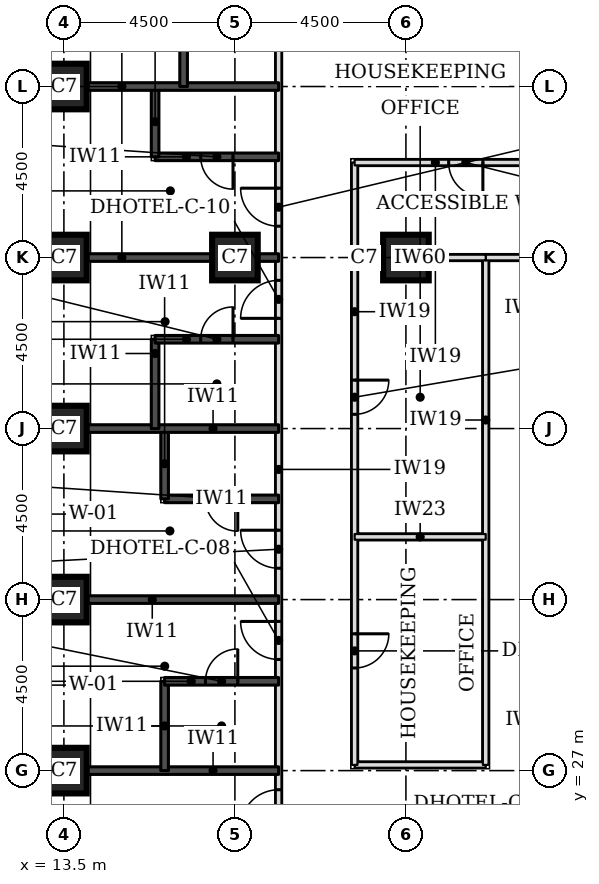
"""IFC4 building model, lengths in metres.
Left out: names, types, materials, properties, quantities, classifications, styles, units other than length and angle.
Written with IfcOpenShell. Run it as: python <this file> out.ifc"""

import sys

from ifc_helpers import new_model, si_unit, direction, frame, frame_2d, origin, origin_2d, place, context, subcontext, project, spatial, rectangle, extrude, element, fill, save


model = new_model("IFC4")
c1 = context("Model", 3, precision=1e-05, world=origin(), true_north=direction((0.0, 1.0)))
c2 = subcontext(c1, "Body", "Model", "MODEL_VIEW")
j1 = project(units=[si_unit("LENGTHUNIT", "METRE"), si_unit("PLANEANGLEUNIT", "RADIAN")], contexts=[c1])
p1 = place(None, origin())
s1 = spatial("IfcSite", under=j1, at=p1, CompositionType="ELEMENT")
p2 = place(p1, origin())
s2 = spatial("IfcBuilding", under=s1, at=p2, CompositionType="ELEMENT")
p3 = place(p2, frame((0.0, 0.0, 33.0)))
s3 = spatial("IfcBuildingStorey", under=s2, at=p3, CompositionType="ELEMENT", Elevation=33.0)
for number, where, z_axis, x_axis in (
    (1, (13.5, 27.0, 0.0), (0.0, 0.0, 1.0), (1.0, 0.0, 0.0)),
    (2, (13.5, 31.5, 0.0), (0.0, 0.0, 1.0), (1.0, 0.0, 0.0)),
    (3, (13.5, 36.0, 0.0), (0.0, 0.0, 1.0), (1.0, 0.0, 0.0)),
    (4, (13.5, 40.5, 0.0), (0.0, 0.0, 1.0), (1.0, 0.0, 0.0)),
    (5, (18.0, 40.5, 0.0), (0.0, 0.0, 1.0), (1.0, 0.0, 0.0)),
    (6, (22.5, 40.5, 0.0), (0.0, 0.0, 1.0), (1.0, 0.0, 0.0)),
    (7, (13.5, 45.0, 0.0), (0.0, 0.0, 1.0), (1.0, 0.0, 0.0)),
):
    element("IfcColumn", number, at=place(p3, frame(where, z_axis=z_axis, x_axis=x_axis)), inside=s3, PredefinedType="COLUMN", context=c2, shape_type="SweptSolid", body=[
        extrude(rectangle(XDim=1.2, YDim=1.2, at=origin_2d()), origin(), (0.0, 0.0, 1.0), 3.3),
    ])
p4 = place(p3, frame((19.15, 25.15, 0.0), z_axis=(0.0, 0.0, 1.0), x_axis=(0.0, 1.0, 0.0)))
e8 = element("IfcWall", 8, at=p4, inside=s3, PredefinedType="PARTITIONING", context=c2, shape_type="SweptSolid", body=[
    extrude(rectangle(XDim=24.35, YDim=0.15, at=frame_2d((12.175, 0.0))), origin(), (0.0, 0.0, 1.0), 3.08),
])
p5 = place(p4, frame((0.347, 0.0, 0.0)))
e9 = element("IfcOpeningElement", 9, at=p5, cuts=e8, PredefinedType="OPENING", context=c2, shape_type="SweptSolid", body=[
    extrude(rectangle(XDim=1.0, YDim=2.1, at=frame_2d((0.5, 1.05))), frame((0.0, 0.085, 0.0), z_axis=(0.0, -1.0, 0.0), x_axis=(1.0, 0.0, 0.0)), (0.0, 0.0, 1.0), 0.17),
])
p6 = place(p4, frame((4.775, 0.0, 0.0)))
e10 = element("IfcOpeningElement", 10, at=p6, cuts=e8, PredefinedType="OPENING", context=c2, shape_type="SweptSolid", body=[
    extrude(rectangle(XDim=1.0, YDim=2.1, at=frame_2d((0.5, 1.05))), frame((0.0, 0.085, 0.0), z_axis=(0.0, -1.0, 0.0), x_axis=(1.0, 0.0, 0.0)), (0.0, 0.0, 1.0), 0.17),
])
p7 = place(p4, frame((7.175, 0.0, 0.0)))
e11 = element("IfcOpeningElement", 11, at=p7, cuts=e8, PredefinedType="OPENING", context=c2, shape_type="SweptSolid", body=[
    extrude(rectangle(XDim=1.0, YDim=2.1, at=frame_2d((0.5, 1.05))), frame((0.0, 0.085, 0.0), z_axis=(0.0, -1.0, 0.0), x_axis=(1.0, 0.0, 0.0)), (0.0, 0.0, 1.0), 0.17),
])
p8 = place(p4, frame((13.75, 0.0, 0.0)))
e12 = element("IfcOpeningElement", 12, at=p8, cuts=e8, PredefinedType="OPENING", context=c2, shape_type="SweptSolid", body=[
    extrude(rectangle(XDim=1.0, YDim=2.1, at=frame_2d((0.5, 1.05))), frame((0.0, 0.085, 0.0), z_axis=(0.0, -1.0, 0.0), x_axis=(1.0, 0.0, 0.0)), (0.0, 0.0, 1.0), 0.17),
])
p9 = place(p4, frame((16.175, 0.0, 0.0)))
e13 = element("IfcOpeningElement", 13, at=p9, cuts=e8, PredefinedType="OPENING", context=c2, shape_type="SweptSolid", body=[
    extrude(rectangle(XDim=1.0, YDim=2.1, at=frame_2d((0.5, 1.05))), frame((0.0, 0.085, 0.0), z_axis=(0.0, -1.0, 0.0), x_axis=(1.0, 0.0, 0.0)), (0.0, 0.0, 1.0), 0.17),
])
p10 = place(p4, frame((22.775, 0.0, 0.0)))
e14 = element("IfcOpeningElement", 14, at=p10, cuts=e8, PredefinedType="OPENING", context=c2, shape_type="SweptSolid", body=[
    extrude(rectangle(XDim=1.0, YDim=2.1, at=frame_2d((0.5, 1.05))), frame((0.0, 0.085, 0.0), z_axis=(0.0, -1.0, 0.0), x_axis=(1.0, 0.0, 0.0)), (0.0, 0.0, 1.0), 0.17),
])
p11 = place(p3, frame((21.15, 27.15, 0.0), z_axis=(0.0, 0.0, 1.0), x_axis=(1.0, 0.0, 0.0)))
e15 = element("IfcWall", 15, at=p11, inside=s3, PredefinedType="PARTITIONING", context=c2, shape_type="SweptSolid", body=[
    extrude(rectangle(XDim=3.45, YDim=0.15, at=frame_2d((1.725, 0.0))), origin(), (0.0, 0.0, 1.0), 3.08),
])
p12 = place(p3, frame((21.15, 27.15, 0.0), z_axis=(0.0, 0.0, 1.0), x_axis=(0.0, 1.0, 0.0)))
e16 = element("IfcWall", 16, at=p12, inside=s3, PredefinedType="PARTITIONING", context=c2, shape_type="SweptSolid", body=[
    extrude(rectangle(XDim=15.85, YDim=0.15, at=frame_2d((7.925, 0.0))), origin(), (0.0, 0.0, 1.0), 3.08),
])
p13 = place(p12, frame((2.55, 0.0, 0.0)))
e17 = element("IfcOpeningElement", 17, at=p13, cuts=e16, PredefinedType="OPENING", context=c2, shape_type="SweptSolid", body=[
    extrude(rectangle(XDim=0.9, YDim=2.1, at=frame_2d((0.45, 1.05))), frame((0.0, 0.085, 0.0), z_axis=(0.0, -1.0, 0.0), x_axis=(1.0, 0.0, 0.0)), (0.0, 0.0, 1.0), 0.17),
])
p14 = place(p12, frame((9.225, 0.0, 0.0)))
e18 = element("IfcOpeningElement", 18, at=p14, cuts=e16, PredefinedType="OPENING", context=c2, shape_type="SweptSolid", body=[
    extrude(rectangle(XDim=0.9, YDim=2.1, at=frame_2d((0.45, 1.05))), frame((0.0, 0.085, 0.0), z_axis=(0.0, -1.0, 0.0), x_axis=(1.0, 0.0, 0.0)), (0.0, 0.0, 1.0), 0.17),
])
p15 = place(p3, frame((24.6, 27.15, 0.0), z_axis=(0.0, 0.0, 1.0), x_axis=(0.0, 1.0, 0.0)))
e19 = element("IfcWall", 19, at=p15, inside=s3, PredefinedType="PARTITIONING", context=c2, shape_type="SweptSolid", body=[
    extrude(rectangle(XDim=13.35, YDim=0.15, at=frame_2d((6.675, 0.0))), origin(), (0.0, 0.0, 1.0), 3.08),
])
p16 = place(p3, frame((24.6, 40.5, 0.0), z_axis=(0.0, 0.0, 1.0), x_axis=(1.0, 0.0, 0.0)))
e20 = element("IfcWall", 20, at=p16, inside=s3, PredefinedType="PARTITIONING", context=c2, shape_type="SweptSolid", body=[
    extrude(rectangle(XDim=2.35, YDim=0.15, at=frame_2d((1.175, 0.0))), origin(), (0.0, 0.0, 1.0), 2.33),
])
p17 = place(p3, frame((21.15, 43.0, 0.0), z_axis=(0.0, 0.0, 1.0), x_axis=(1.0, 0.0, 0.0)))
e21 = element("IfcWall", 21, at=p17, inside=s3, PredefinedType="PARTITIONING", context=c2, shape_type="SweptSolid", body=[
    extrude(rectangle(XDim=5.85, YDim=0.15, at=frame_2d((2.925, 0.0))), origin(), (0.0, 0.0, 1.0), 3.08),
])
p18 = place(p17, frame((2.475, 0.0, 0.0)))
e22 = element("IfcOpeningElement", 22, at=p18, cuts=e21, PredefinedType="OPENING", context=c2, shape_type="SweptSolid", body=[
    extrude(rectangle(XDim=0.9, YDim=2.1, at=frame_2d((0.45, 1.05))), frame((0.0, 0.085, 0.0), z_axis=(0.0, -1.0, 0.0), x_axis=(1.0, 0.0, 0.0)), (0.0, 0.0, 1.0), 0.17),
])
p19 = place(p3, frame((14.1, 27.0, 0.0), z_axis=(0.0, 0.0, 1.0), x_axis=(1.0, 0.0, 0.0)))
e23 = element("IfcWall", 23, at=p19, inside=s3, PredefinedType="SOLIDWALL", context=c2, shape_type="SweptSolid", body=[
    extrude(rectangle(XDim=5.05, YDim=0.2, at=frame_2d((2.525, 0.0))), origin(), (0.0, 0.0, 1.0), 3.08),
])
p20 = place(p3, frame((16.15, 27.0, 0.0), z_axis=(0.0, 0.0, 1.0), x_axis=(0.0, 1.0, 0.0)))
e24 = element("IfcWall", 24, at=p20, inside=s3, PredefinedType="SOLIDWALL", context=c2, shape_type="SweptSolid", body=[
    extrude(rectangle(XDim=2.35, YDim=0.2, at=frame_2d((1.175, 0.0))), origin(), (0.0, 0.0, 1.0), 3.08),
])
p21 = place(p3, frame((16.15, 29.35, 0.0), z_axis=(0.0, 0.0, 1.0), x_axis=(1.0, 0.0, 0.0)))
e25 = element("IfcWall", 25, at=p21, inside=s3, PredefinedType="SOLIDWALL", context=c2, shape_type="SweptSolid", body=[
    extrude(rectangle(XDim=3.0, YDim=0.2, at=frame_2d((1.5, 0.0))), origin(), (0.0, 0.0, 1.0), 3.08),
])
p22 = place(p21, frame((1.075, 0.0, 0.0)))
e26 = element("IfcOpeningElement", 26, at=p22, cuts=e25, PredefinedType="OPENING", context=c2, shape_type="SweptSolid", body=[
    extrude(rectangle(XDim=0.85, YDim=2.1, at=frame_2d((0.425, 1.05))), frame((0.0, 0.11, 0.0), z_axis=(0.0, -1.0, 0.0), x_axis=(1.0, 0.0, 0.0)), (0.0, 0.0, 1.0), 0.22),
])
p23 = place(p3, frame((14.1, 31.5, 0.0), z_axis=(0.0, 0.0, 1.0), x_axis=(1.0, 0.0, 0.0)))
e27 = element("IfcWall", 27, at=p23, inside=s3, PredefinedType="SOLIDWALL", context=c2, shape_type="SweptSolid", body=[
    extrude(rectangle(XDim=5.05, YDim=0.2, at=frame_2d((2.525, 0.0))), origin(), (0.0, 0.0, 1.0), 3.08),
])
p24 = place(p3, frame((16.15, 34.15, 0.0), z_axis=(0.0, 0.0, 1.0), x_axis=(1.0, 0.0, 0.0)))
e28 = element("IfcWall", 28, at=p24, inside=s3, PredefinedType="SOLIDWALL", context=c2, shape_type="SweptSolid", body=[
    extrude(rectangle(XDim=3.0, YDim=0.2, at=frame_2d((1.5, 0.0))), origin(), (0.0, 0.0, 1.0), 3.08),
])
p25 = place(p24, frame((1.075, 0.0, 0.0)))
e29 = element("IfcOpeningElement", 29, at=p25, cuts=e28, PredefinedType="OPENING", context=c2, shape_type="SweptSolid", body=[
    extrude(rectangle(XDim=0.85, YDim=2.1, at=frame_2d((0.425, 1.05))), frame((0.0, 0.11, 0.0), z_axis=(0.0, -1.0, 0.0), x_axis=(1.0, 0.0, 0.0)), (0.0, 0.0, 1.0), 0.22),
])
p26 = place(p3, frame((16.15, 34.15, 0.0), z_axis=(0.0, 0.0, 1.0), x_axis=(0.0, 1.0, 0.0)))
e30 = element("IfcWall", 30, at=p26, inside=s3, PredefinedType="SOLIDWALL", context=c2, shape_type="SweptSolid", body=[
    extrude(rectangle(XDim=1.85, YDim=0.2, at=frame_2d((0.925, 0.0))), origin(), (0.0, 0.0, 1.0), 3.08),
])
p27 = place(p3, frame((14.1, 36.0, 0.0), z_axis=(0.0, 0.0, 1.0), x_axis=(1.0, 0.0, 0.0)))
e31 = element("IfcWall", 31, at=p27, inside=s3, PredefinedType="SOLIDWALL", context=c2, shape_type="SweptSolid", body=[
    extrude(rectangle(XDim=5.05, YDim=0.2, at=frame_2d((2.525, 0.0))), origin(), (0.0, 0.0, 1.0), 3.08),
])
p28 = place(p3, frame((15.9, 36.0, 0.0), z_axis=(0.0, 0.0, 1.0), x_axis=(0.0, 1.0, 0.0)))
e32 = element("IfcWall", 32, at=p28, inside=s3, PredefinedType="SOLIDWALL", context=c2, shape_type="SweptSolid", body=[
    extrude(rectangle(XDim=2.35, YDim=0.2, at=frame_2d((1.175, 0.0))), origin(), (0.0, 0.0, 1.0), 3.08),
])
p29 = place(p3, frame((15.9, 38.35, 0.0), z_axis=(0.0, 0.0, 1.0), x_axis=(1.0, 0.0, 0.0)))
e33 = element("IfcWall", 33, at=p29, inside=s3, PredefinedType="SOLIDWALL", context=c2, shape_type="SweptSolid", body=[
    extrude(rectangle(XDim=3.25, YDim=0.2, at=frame_2d((1.625, 0.0))), origin(), (0.0, 0.0, 1.0), 3.08),
])
p30 = place(p29, frame((1.2, 0.0, 0.0)))
e34 = element("IfcOpeningElement", 34, at=p30, cuts=e33, PredefinedType="OPENING", context=c2, shape_type="SweptSolid", body=[
    extrude(rectangle(XDim=0.85, YDim=2.1, at=frame_2d((0.425, 1.05))), frame((0.0, 0.11, 0.0), z_axis=(0.0, -1.0, 0.0), x_axis=(1.0, 0.0, 0.0)), (0.0, 0.0, 1.0), 0.22),
])
p31 = place(p3, frame((14.1, 40.5, 0.0), z_axis=(0.0, 0.0, 1.0), x_axis=(1.0, 0.0, 0.0)))
e35 = element("IfcWall", 35, at=p31, inside=s3, PredefinedType="SOLIDWALL", context=c2, shape_type="SweptSolid", body=[
    extrude(rectangle(XDim=5.05, YDim=0.2, at=frame_2d((2.525, 0.0))), origin(), (0.0, 0.0, 1.0), 3.08),
])
p32 = place(p3, frame((15.9, 43.15, 0.0), z_axis=(0.0, 0.0, 1.0), x_axis=(1.0, 0.0, 0.0)))
e36 = element("IfcWall", 36, at=p32, inside=s3, PredefinedType="SOLIDWALL", context=c2, shape_type="SweptSolid", body=[
    extrude(rectangle(XDim=3.25, YDim=0.2, at=frame_2d((1.625, 0.0))), origin(), (0.0, 0.0, 1.0), 3.08),
])
p33 = place(p32, frame((1.2, 0.0, 0.0)))
e37 = element("IfcOpeningElement", 37, at=p33, cuts=e36, PredefinedType="OPENING", context=c2, shape_type="SweptSolid", body=[
    extrude(rectangle(XDim=0.85, YDim=2.1, at=frame_2d((0.425, 1.05))), frame((0.0, 0.11, 0.0), z_axis=(0.0, -1.0, 0.0), x_axis=(1.0, 0.0, 0.0)), (0.0, 0.0, 1.0), 0.22),
])
p34 = place(p3, frame((15.9, 43.15, 0.0), z_axis=(0.0, 0.0, 1.0), x_axis=(0.0, 1.0, 0.0)))
e38 = element("IfcWall", 38, at=p34, inside=s3, PredefinedType="SOLIDWALL", context=c2, shape_type="SweptSolid", body=[
    extrude(rectangle(XDim=1.85, YDim=0.2, at=frame_2d((0.925, 0.0))), origin(), (0.0, 0.0, 1.0), 3.08),
])
p35 = place(p3, frame((14.1, 45.0, 0.0), z_axis=(0.0, 0.0, 1.0), x_axis=(1.0, 0.0, 0.0)))
e39 = element("IfcWall", 39, at=p35, inside=s3, PredefinedType="SOLIDWALL", context=c2, shape_type="SweptSolid", body=[
    extrude(rectangle(XDim=5.05, YDim=0.2, at=frame_2d((2.525, 0.0))), origin(), (0.0, 0.0, 1.0), 3.08),
])
p36 = place(p3, frame((16.65, 45.0, 0.0), z_axis=(0.0, 0.0, 1.0), x_axis=(0.0, 1.0, 0.0)))
e40 = element("IfcWall", 40, at=p36, inside=s3, PredefinedType="SOLIDWALL", context=c2, shape_type="SweptSolid", body=[
    extrude(rectangle(XDim=2.35, YDim=0.2, at=frame_2d((1.175, 0.0))), origin(), (0.0, 0.0, 1.0), 3.08),
])
p37 = place(p3, frame((21.15, 33.15, 0.0), z_axis=(0.0, 0.0, 1.0), x_axis=(1.0, 0.0, 0.0)))
e41 = element("IfcWall", 41, at=p37, inside=s3, PredefinedType="PARTITIONING", context=c2, shape_type="SweptSolid", body=[
    extrude(rectangle(XDim=3.45, YDim=0.15, at=frame_2d((1.725, 0.0))), origin(), (0.0, 0.0, 1.0), 3.08),
])
p38 = place(p3, frame((21.15, 40.5, 0.0), z_axis=(0.0, 0.0, 1.0), x_axis=(1.0, 0.0, 0.0)))
e42 = element("IfcWall", 42, at=p38, inside=s3, PredefinedType="PARTITIONING", context=c2, shape_type="SweptSolid", body=[
    extrude(rectangle(XDim=3.45, YDim=0.15, at=frame_2d((1.725, 0.0))), origin(), (0.0, 0.0, 1.0), 2.33),
])
p39 = place(p5, origin())
e43 = element("IfcDoor", 43, at=p39, inside=s3, OperationType="SINGLE_SWING_LEFT", PredefinedType="DOOR", context=c2, shape_type="SweptSolid", body=[
    extrude(rectangle(XDim=1.0, YDim=2.1, at=frame_2d((0.5, 1.05))), frame((0.0, 0.025, 0.0), z_axis=(0.0, -1.0, 0.0), x_axis=(1.0, 0.0, 0.0)), (0.0, 0.0, 1.0), 0.05),
])
fill(e9, e43)
p40 = place(p6, origin())
e44 = element("IfcDoor", 44, at=p40, inside=s3, OperationType="SINGLE_SWING_RIGHT", PredefinedType="DOOR", context=c2, shape_type="SweptSolid", body=[
    extrude(rectangle(XDim=1.0, YDim=2.1, at=frame_2d((0.5, 1.05))), frame((0.0, 0.025, 0.0), z_axis=(0.0, -1.0, 0.0), x_axis=(1.0, 0.0, 0.0)), (0.0, 0.0, 1.0), 0.05),
])
fill(e10, e44)
p41 = place(p22, origin())
e45 = element("IfcDoor", 45, at=p41, inside=s3, OperationType="SINGLE_SWING_RIGHT", PredefinedType="DOOR", context=c2, shape_type="SweptSolid", body=[
    extrude(rectangle(XDim=0.85, YDim=2.1, at=frame_2d((0.425, 1.05))), frame((0.0, 0.025, 0.0), z_axis=(0.0, -1.0, 0.0), x_axis=(1.0, 0.0, 0.0)), (0.0, 0.0, 1.0), 0.05),
])
fill(e26, e45)
p42 = place(p7, origin())
e46 = element("IfcDoor", 46, at=p42, inside=s3, OperationType="SINGLE_SWING_RIGHT", PredefinedType="DOOR", context=c2, shape_type="SweptSolid", body=[
    extrude(rectangle(XDim=1.0, YDim=2.1, at=frame_2d((0.5, 1.05))), frame((0.0, 0.025, 0.0), z_axis=(0.0, -1.0, 0.0), x_axis=(1.0, 0.0, 0.0)), (0.0, 0.0, 1.0), 0.05),
])
fill(e11, e46)
p43 = place(p25, frame((0.85, 0.0, 0.0), z_axis=(0.0, 0.0, 1.0), x_axis=(-1.0, 0.0, 0.0)))
e47 = element("IfcDoor", 47, at=p43, inside=s3, OperationType="SINGLE_SWING_LEFT", PredefinedType="DOOR", context=c2, shape_type="SweptSolid", body=[
    extrude(rectangle(XDim=0.85, YDim=2.1, at=frame_2d((0.425, 1.05))), frame((0.0, 0.025, 0.0), z_axis=(0.0, -1.0, 0.0), x_axis=(1.0, 0.0, 0.0)), (0.0, 0.0, 1.0), 0.05),
])
fill(e29, e47)
p44 = place(p8, origin())
e48 = element("IfcDoor", 48, at=p44, inside=s3, OperationType="SINGLE_SWING_LEFT", PredefinedType="DOOR", context=c2, shape_type="SweptSolid", body=[
    extrude(rectangle(XDim=1.0, YDim=2.1, at=frame_2d((0.5, 1.05))), frame((0.0, 0.025, 0.0), z_axis=(0.0, -1.0, 0.0), x_axis=(1.0, 0.0, 0.0)), (0.0, 0.0, 1.0), 0.05),
])
fill(e12, e48)
p45 = place(p30, origin())
e49 = element("IfcDoor", 49, at=p45, inside=s3, OperationType="SINGLE_SWING_RIGHT", PredefinedType="DOOR", context=c2, shape_type="SweptSolid", body=[
    extrude(rectangle(XDim=0.85, YDim=2.1, at=frame_2d((0.425, 1.05))), frame((0.0, 0.025, 0.0), z_axis=(0.0, -1.0, 0.0), x_axis=(1.0, 0.0, 0.0)), (0.0, 0.0, 1.0), 0.05),
])
fill(e34, e49)
p46 = place(p9, origin())
e50 = element("IfcDoor", 50, at=p46, inside=s3, OperationType="SINGLE_SWING_RIGHT", PredefinedType="DOOR", context=c2, shape_type="SweptSolid", body=[
    extrude(rectangle(XDim=1.0, YDim=2.1, at=frame_2d((0.5, 1.05))), frame((0.0, 0.025, 0.0), z_axis=(0.0, -1.0, 0.0), x_axis=(1.0, 0.0, 0.0)), (0.0, 0.0, 1.0), 0.05),
])
fill(e13, e50)
p47 = place(p33, frame((0.85, 0.0, 0.0), z_axis=(0.0, 0.0, 1.0), x_axis=(-1.0, 0.0, 0.0)))
e51 = element("IfcDoor", 51, at=p47, inside=s3, OperationType="SINGLE_SWING_LEFT", PredefinedType="DOOR", context=c2, shape_type="SweptSolid", body=[
    extrude(rectangle(XDim=0.85, YDim=2.1, at=frame_2d((0.425, 1.05))), frame((0.0, 0.025, 0.0), z_axis=(0.0, -1.0, 0.0), x_axis=(1.0, 0.0, 0.0)), (0.0, 0.0, 1.0), 0.05),
])
fill(e37, e51)
p48 = place(p13, frame((0.9, 0.0, 0.0), z_axis=(0.0, 0.0, 1.0), x_axis=(-1.0, 0.0, 0.0)))
e52 = element("IfcDoor", 52, at=p48, inside=s3, OperationType="SINGLE_SWING_LEFT", PredefinedType="DOOR", context=c2, shape_type="SweptSolid", body=[
    extrude(rectangle(XDim=0.9, YDim=2.1, at=frame_2d((0.45, 1.05))), frame((0.0, 0.025, 0.0), z_axis=(0.0, -1.0, 0.0), x_axis=(1.0, 0.0, 0.0)), (0.0, 0.0, 1.0), 0.05),
])
fill(e17, e52)
p49 = place(p14, frame((0.9, 0.0, 0.0), z_axis=(0.0, 0.0, 1.0), x_axis=(-1.0, 0.0, 0.0)))
e53 = element("IfcDoor", 53, at=p49, inside=s3, OperationType="SINGLE_SWING_LEFT", PredefinedType="DOOR", context=c2, shape_type="SweptSolid", body=[
    extrude(rectangle(XDim=0.9, YDim=2.1, at=frame_2d((0.45, 1.05))), frame((0.0, 0.025, 0.0), z_axis=(0.0, -1.0, 0.0), x_axis=(1.0, 0.0, 0.0)), (0.0, 0.0, 1.0), 0.05),
])
fill(e18, e53)
p50 = place(p18, frame((0.9, 0.0, 0.0), z_axis=(0.0, 0.0, 1.0), x_axis=(-1.0, 0.0, 0.0)))
e54 = element("IfcDoor", 54, at=p50, inside=s3, OperationType="SINGLE_SWING_LEFT", PredefinedType="DOOR", context=c2, shape_type="SweptSolid", body=[
    extrude(rectangle(XDim=0.9, YDim=2.1, at=frame_2d((0.45, 1.05))), frame((0.0, 0.025, 0.0), z_axis=(0.0, -1.0, 0.0), x_axis=(1.0, 0.0, 0.0)), (0.0, 0.0, 1.0), 0.05),
])
fill(e22, e54)
save(model, sys.argv[1])
